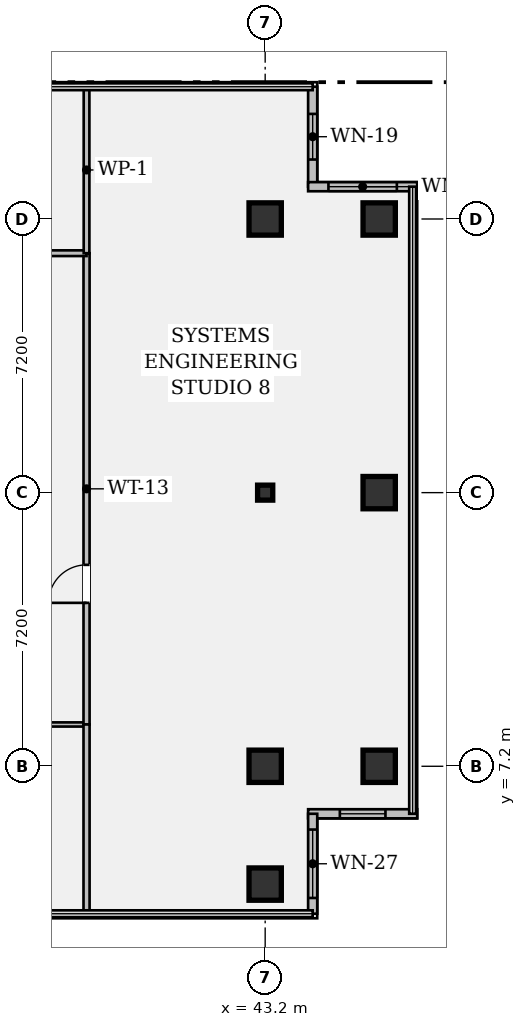
"""IFC4 building model, lengths in metres.
Left out: names, types, materials, properties, quantities, classifications, styles, units other than length and angle.
Written with IfcOpenShell. Run it as: python <this file> out.ifc"""

import sys

from ifc_helpers import new_model, si_unit, direction, frame, frame_2d, origin, origin_2d, place, context, subcontext, project, spatial, rectangle, hollow_rectangle, i_section, extrude, element, fill, save


model = new_model("IFC4")
c1 = context("Model", 3, precision=1e-05, world=origin(), true_north=direction((0.0, 1.0)))
c2 = subcontext(c1, "Body", "Model", "MODEL_VIEW")
j1 = project(units=[si_unit("LENGTHUNIT", "METRE"), si_unit("PLANEANGLEUNIT", "RADIAN")], contexts=[c1])
p1 = place(None, origin())
s1 = spatial("IfcSite", under=j1, at=p1, CompositionType="ELEMENT")
p2 = place(p1, origin())
s2 = spatial("IfcBuilding", under=s1, at=p2, CompositionType="ELEMENT")
p3 = place(p2, frame((0.0, 0.0, 152.25)))
s3 = spatial("IfcBuildingStorey", under=s2, at=p3, CompositionType="ELEMENT", Elevation=152.25)
for number, where, z_axis, x_axis in (
    (1, (43.2, 4.1, 0.0), (0.0, 0.0, 1.0), (1.0, 0.0, 0.0)),
    (2, (43.2, 7.2, 0.0), (0.0, 0.0, 1.0), (1.0, 0.0, 0.0)),
):
    element("IfcColumn", number, at=place(p3, frame(where, z_axis=z_axis, x_axis=x_axis)), inside=s3, PredefinedType="COLUMN", context=c2, shape_type="SweptSolid", body=[
        extrude(hollow_rectangle(XDim=0.85, YDim=0.85, WallThickness=0.05, at=origin_2d()), origin(), (0.0, 0.0, 1.0), 3.58),
    ])
p4 = place(p3, frame((43.2, 14.4, 0.0), z_axis=(0.0, 0.0, 1.0), x_axis=(1.0, 0.0, 0.0)))
e3 = element("IfcColumn", 3, at=p4, inside=s3, PredefinedType="COLUMN", context=c2, shape_type="SweptSolid", body=[
    extrude(i_section(OverallWidth=0.399, OverallDepth=0.394, WebThickness=0.023, FlangeThickness=0.037, FilletRadius=0.018, at=origin_2d()), origin(), (0.0, 0.0, 1.0), 3.58),
])
for number, where, z_axis, x_axis in (
    (4, (43.2, 21.6, 0.0), (0.0, 0.0, 1.0), (1.0, 0.0, 0.0)),
    (5, (46.2, 7.2, 0.0), (0.0, 0.0, 1.0), (1.0, 0.0, 0.0)),
    (6, (46.2, 14.4, 0.0), (0.0, 0.0, 1.0), (1.0, 0.0, 0.0)),
    (7, (46.2, 21.6, 0.0), (0.0, 0.0, 1.0), (1.0, 0.0, 0.0)),
):
    element("IfcColumn", number, at=place(p3, frame(where, z_axis=z_axis, x_axis=x_axis)), inside=s3, PredefinedType="COLUMN", context=c2, shape_type="SweptSolid", body=[
        extrude(hollow_rectangle(XDim=0.85, YDim=0.85, WallThickness=0.05, at=origin_2d()), origin(), (0.0, 0.0, 1.0), 3.58),
    ])
p5 = place(p3, frame((44.45, 25.08, 0.0), z_axis=(0.0, 0.0, 1.0), x_axis=(0.0, -1.0, 0.0)))
e8 = element("IfcWall", 8, at=p5, inside=s3, PredefinedType="STANDARD", context=c2, shape_type="SweptSolid", body=[
    extrude(rectangle(XDim=2.63, YDim=0.24, at=frame_2d((1.315, 0.0))), origin(), (0.0, 0.0, 1.0), 3.58),
])
p6 = place(p5, frame((0.715, 0.0, 0.95)))
e9 = element("IfcOpeningElement", 9, at=p6, cuts=e8, PredefinedType="OPENING", context=c2, shape_type="SweptSolid", body=[
    extrude(rectangle(XDim=1.2, YDim=1.8, at=frame_2d((0.6, 0.9))), frame((0.0, 0.132, 0.0), z_axis=(0.0, -1.0, 0.0), x_axis=(1.0, 0.0, 0.0)), (0.0, 0.0, 1.0), 0.264),
])
p7 = place(p3, frame((44.33, 22.45, 0.0), z_axis=(0.0, 0.0, 1.0), x_axis=(1.0, 0.0, 0.0)))
e10 = element("IfcWall", 10, at=p7, inside=s3, PredefinedType="STANDARD", context=c2, shape_type="SweptSolid", body=[
    extrude(rectangle(XDim=2.87, YDim=0.24, at=frame_2d((1.435, 0.0))), origin(), (0.0, 0.0, 1.0), 3.58),
])
p8 = place(p7, frame((0.535, 0.0, 0.95)))
e11 = element("IfcOpeningElement", 11, at=p8, cuts=e10, PredefinedType="OPENING", context=c2, shape_type="SweptSolid", body=[
    extrude(rectangle(XDim=1.8, YDim=1.35, at=frame_2d((0.9, 0.675))), frame((0.0, 0.132, 0.0), z_axis=(0.0, -1.0, 0.0), x_axis=(1.0, 0.0, 0.0)), (0.0, 0.0, 1.0), 0.264),
])
p9 = place(p3, frame((47.2, 5.95, 0.0), z_axis=(0.0, 0.0, 1.0), x_axis=(-1.0, 0.0, 0.0)))
e12 = element("IfcWall", 12, at=p9, inside=s3, PredefinedType="STANDARD", context=c2, shape_type="SweptSolid", body=[
    extrude(rectangle(XDim=2.87, YDim=0.24, at=frame_2d((1.435, 0.0))), origin(), (0.0, 0.0, 1.0), 3.58),
])
p10 = place(p9, frame((0.835, 0.0, 0.95)))
e13 = element("IfcOpeningElement", 13, at=p10, cuts=e12, PredefinedType="OPENING", context=c2, shape_type="SweptSolid", body=[
    extrude(rectangle(XDim=1.2, YDim=1.8, at=frame_2d((0.6, 0.9))), frame((0.0, 0.132, 0.0), z_axis=(0.0, -1.0, 0.0), x_axis=(1.0, 0.0, 0.0)), (0.0, 0.0, 1.0), 0.264),
])
p11 = place(p3, frame((44.45, 5.95, 0.0), z_axis=(0.0, 0.0, 1.0), x_axis=(0.0, -1.0, 0.0)))
e14 = element("IfcWall", 14, at=p11, inside=s3, PredefinedType="STANDARD", context=c2, shape_type="SweptSolid", body=[
    extrude(rectangle(XDim=2.63, YDim=0.24, at=frame_2d((1.315, 0.0))), origin(), (0.0, 0.0, 1.0), 3.58),
])
p12 = place(p11, frame((0.415, 0.0, 0.95)))
e15 = element("IfcOpeningElement", 15, at=p12, cuts=e14, PredefinedType="OPENING", context=c2, shape_type="SweptSolid", body=[
    extrude(rectangle(XDim=1.8, YDim=1.35, at=frame_2d((0.9, 0.675))), frame((0.0, 0.132, 0.0), z_axis=(0.0, -1.0, 0.0), x_axis=(1.0, 0.0, 0.0)), (0.0, 0.0, 1.0), 0.264),
])
p13 = place(p3, frame((17.35, 8.3, 0.0), z_axis=(0.0, 0.0, 1.0), x_axis=(1.0, 0.0, 0.0)))
e16 = element("IfcWall", 16, at=p13, inside=s3, PredefinedType="PARTITIONING", context=c2, shape_type="SweptSolid", body=[
    extrude(rectangle(XDim=21.15, YDim=0.11, at=frame_2d((10.575, 0.0))), origin(), (0.0, 0.0, 1.0), 2.869),
])
p14 = place(p13, frame((2.32, 0.0, 0.0)))
e17 = element("IfcOpeningElement", 17, at=p14, cuts=e16, PredefinedType="OPENING", context=c2, shape_type="SweptSolid", body=[
    extrude(rectangle(XDim=0.88, YDim=2.15, at=frame_2d((0.44, 1.075))), frame((0.0, 0.067, 0.0), z_axis=(0.0, -1.0, 0.0), x_axis=(1.0, 0.0, 0.0)), (0.0, 0.0, 1.0), 0.134),
])
p15 = place(p13, frame((9.85, 0.0, 0.0)))
e18 = element("IfcOpeningElement", 18, at=p15, cuts=e16, PredefinedType="OPENING", context=c2, shape_type="SweptSolid", body=[
    extrude(rectangle(XDim=0.88, YDim=2.15, at=frame_2d((0.44, 1.075))), frame((0.0, 0.067, 0.0), z_axis=(0.0, -1.0, 0.0), x_axis=(1.0, 0.0, 0.0)), (0.0, 0.0, 1.0), 0.134),
])
p16 = place(p13, frame((16.8, 0.0, 0.0)))
e19 = element("IfcOpeningElement", 19, at=p16, cuts=e16, PredefinedType="OPENING", context=c2, shape_type="SweptSolid", body=[
    extrude(rectangle(XDim=0.88, YDim=2.15, at=frame_2d((0.44, 1.075))), frame((0.0, 0.067, 0.0), z_axis=(0.0, -1.0, 0.0), x_axis=(1.0, 0.0, 0.0)), (0.0, 0.0, 1.0), 0.134),
])
p17 = place(p3, frame((38.5, 8.3, 0.0), z_axis=(0.0, 0.0, 1.0), x_axis=(0.0, 1.0, 0.0)))
e20 = element("IfcWall", 20, at=p17, inside=s3, PredefinedType="PARTITIONING", context=c2, shape_type="SweptSolid", body=[
    extrude(rectangle(XDim=12.4, YDim=0.16, at=frame_2d((6.2, 0.0))), origin(), (0.0, 0.0, 1.0), 2.165),
])
p18 = place(p17, frame((3.2, 0.0, 0.0)))
e21 = element("IfcOpeningElement", 21, at=p18, cuts=e20, PredefinedType="OPENING", context=c2, shape_type="SweptSolid", body=[
    extrude(rectangle(XDim=1.0, YDim=2.02, at=frame_2d((0.5, 1.01))), frame((0.0, 0.092, 0.0), z_axis=(0.0, -1.0, 0.0), x_axis=(1.0, 0.0, 0.0)), (0.0, 0.0, 1.0), 0.184),
])
p19 = place(p3, frame((17.35, 20.7, 0.0), z_axis=(0.0, 0.0, 1.0), x_axis=(1.0, 0.0, 0.0)))
e22 = element("IfcWall", 22, at=p19, inside=s3, PredefinedType="PARTITIONING", context=c2, shape_type="SweptSolid", body=[
    extrude(rectangle(XDim=21.15, YDim=0.15, at=frame_2d((10.575, 0.0))), origin(), (0.0, 0.0, 1.0), 2.869),
])
p20 = place(p19, frame((0.85, 0.0, 0.0)))
e23 = element("IfcOpeningElement", 23, at=p20, cuts=e22, PredefinedType="OPENING", context=c2, shape_type="SweptSolid", body=[
    extrude(rectangle(XDim=0.85, YDim=2.15, at=frame_2d((0.425, 1.075))), frame((0.0, 0.087, 0.0), z_axis=(0.0, -1.0, 0.0), x_axis=(1.0, 0.0, 0.0)), (0.0, 0.0, 1.0), 0.174),
])
p21 = place(p19, frame((4.75, 0.0, 0.0)))
e24 = element("IfcOpeningElement", 24, at=p21, cuts=e22, PredefinedType="OPENING", context=c2, shape_type="SweptSolid", body=[
    extrude(rectangle(XDim=0.85, YDim=2.15, at=frame_2d((0.425, 1.075))), frame((0.0, 0.087, 0.0), z_axis=(0.0, -1.0, 0.0), x_axis=(1.0, 0.0, 0.0)), (0.0, 0.0, 1.0), 0.174),
])
p22 = place(p19, frame((6.81, 0.0, 0.0)))
e25 = element("IfcOpeningElement", 25, at=p22, cuts=e22, PredefinedType="OPENING", context=c2, shape_type="SweptSolid", body=[
    extrude(rectangle(XDim=0.85, YDim=2.15, at=frame_2d((0.425, 1.075))), frame((0.0, 0.087, 0.0), z_axis=(0.0, -1.0, 0.0), x_axis=(1.0, 0.0, 0.0)), (0.0, 0.0, 1.0), 0.174),
])
p23 = place(p19, frame((9.37, 0.0, 0.0)))
e26 = element("IfcOpeningElement", 26, at=p23, cuts=e22, PredefinedType="OPENING", context=c2, shape_type="SweptSolid", body=[
    extrude(rectangle(XDim=0.88, YDim=2.15, at=frame_2d((0.44, 1.075))), frame((0.0, 0.087, 0.0), z_axis=(0.0, -1.0, 0.0), x_axis=(1.0, 0.0, 0.0)), (0.0, 0.0, 1.0), 0.174),
])
p24 = place(p3, frame((38.5, 3.32, 0.0), z_axis=(0.0, 0.0, 1.0), x_axis=(0.0, 1.0, 0.0)))
e27 = element("IfcWall", 27, at=p24, inside=s3, PredefinedType="PARTITIONING", context=c2, shape_type="SweptSolid", body=[
    extrude(rectangle(XDim=4.98, YDim=0.16, at=frame_2d((2.49, 0.0))), origin(), (0.0, 0.0, 1.0), 2.869),
])
p25 = place(p3, frame((38.5, 20.7, 0.0), z_axis=(0.0, 0.0, 1.0), x_axis=(0.0, 1.0, 0.0)))
e28 = element("IfcWall", 28, at=p25, inside=s3, PredefinedType="PARTITIONING", context=c2, shape_type="SweptSolid", body=[
    extrude(rectangle(XDim=4.38, YDim=0.15, at=frame_2d((2.19, 0.0))), origin(), (0.0, 0.0, 1.0), 2.165),
])
p26 = place(p6, origin())
e29 = element("IfcWindow", 29, at=p26, inside=s3, PartitioningType="SINGLE_PANEL", PredefinedType="WINDOW", context=c2, shape_type="SweptSolid", body=[
    extrude(rectangle(XDim=1.2, YDim=1.8, at=frame_2d((0.6, 0.9))), frame((0.0, 0.03, 0.0), z_axis=(0.0, -1.0, 0.0), x_axis=(1.0, 0.0, 0.0)), (0.0, 0.0, 1.0), 0.06),
])
fill(e9, e29)
p27 = place(p8, origin())
e30 = element("IfcWindow", 30, at=p27, inside=s3, PartitioningType="SINGLE_PANEL", PredefinedType="WINDOW", context=c2, shape_type="SweptSolid", body=[
    extrude(rectangle(XDim=1.8, YDim=1.35, at=frame_2d((0.9, 0.675))), frame((0.0, 0.03, 0.0), z_axis=(0.0, -1.0, 0.0), x_axis=(1.0, 0.0, 0.0)), (0.0, 0.0, 1.0), 0.06),
])
fill(e11, e30)
p28 = place(p10, origin())
e31 = element("IfcWindow", 31, at=p28, inside=s3, PartitioningType="SINGLE_PANEL", PredefinedType="WINDOW", context=c2, shape_type="SweptSolid", body=[
    extrude(rectangle(XDim=1.2, YDim=1.8, at=frame_2d((0.6, 0.9))), frame((0.0, 0.03, 0.0), z_axis=(0.0, -1.0, 0.0), x_axis=(1.0, 0.0, 0.0)), (0.0, 0.0, 1.0), 0.06),
])
fill(e13, e31)
p29 = place(p12, origin())
e32 = element("IfcWindow", 32, at=p29, inside=s3, PartitioningType="SINGLE_PANEL", PredefinedType="WINDOW", context=c2, shape_type="SweptSolid", body=[
    extrude(rectangle(XDim=1.8, YDim=1.35, at=frame_2d((0.9, 0.675))), frame((0.0, 0.03, 0.0), z_axis=(0.0, -1.0, 0.0), x_axis=(1.0, 0.0, 0.0)), (0.0, 0.0, 1.0), 0.06),
])
fill(e15, e32)
p30 = place(p18, origin())
e33 = element("IfcDoor", 33, at=p30, inside=s3, OperationType="SINGLE_SWING_LEFT", PredefinedType="DOOR", context=c2, shape_type="SweptSolid", body=[
    extrude(rectangle(XDim=1.0, YDim=2.02, at=frame_2d((0.5, 1.01))), frame((0.0, 0.025, 0.0), z_axis=(0.0, -1.0, 0.0), x_axis=(1.0, 0.0, 0.0)), (0.0, 0.0, 1.0), 0.05),
])
fill(e21, e33)
save(model, sys.argv[1])
